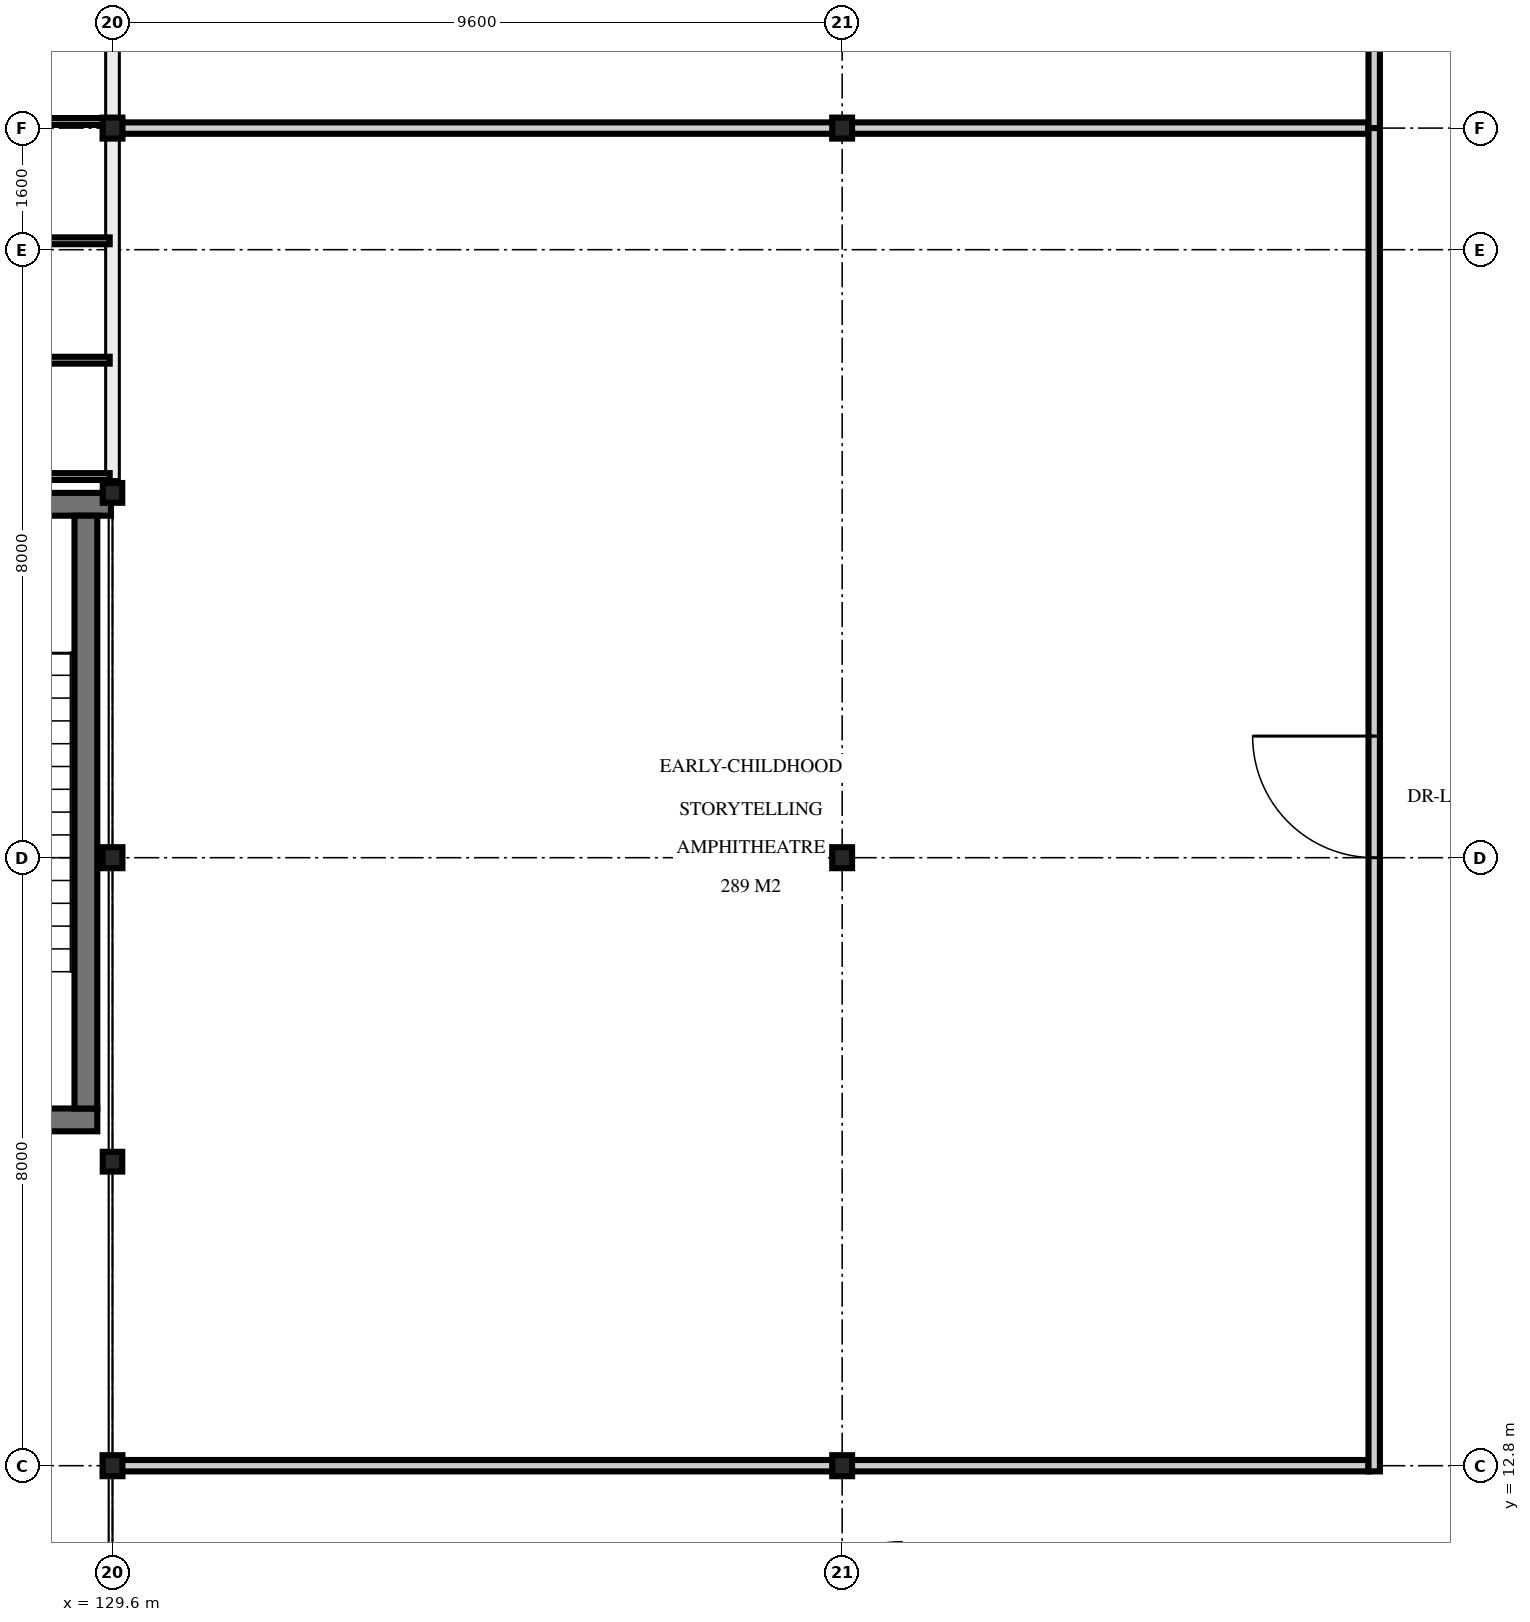
"""IFC4 building model, lengths in metres.
Left out: names, types, materials, properties, quantities, classifications, styles, units other than length and angle.
Written with IfcOpenShell. Run it as: python <this file> out.ifc"""

import sys

from ifc_helpers import new_model, si_unit, direction, frame, frame_2d, origin, origin_2d, place, context, subcontext, project, spatial, rectangle, i_section, extrude, element, fill, save


model = new_model("IFC4")
c1 = context("Model", 3, precision=1e-05, world=origin(), true_north=direction((0.0, 1.0)))
c2 = subcontext(c1, "Body", "Model", "MODEL_VIEW")
j1 = project(units=[si_unit("LENGTHUNIT", "METRE"), si_unit("PLANEANGLEUNIT", "RADIAN")], contexts=[c1])
p1 = place(None, origin())
s1 = spatial("IfcSite", under=j1, at=p1, CompositionType="ELEMENT")
p2 = place(p1, origin())
s2 = spatial("IfcBuilding", under=s1, at=p2, CompositionType="ELEMENT")
p3 = place(p2, origin())
s3 = spatial("IfcBuildingStorey", under=s2, at=p3, CompositionType="ELEMENT", Elevation=0.0)
for number, where, z_axis, x_axis in (
    (1, (129.6, 12.8, 0.0), (0.0, 0.0, 1.0), (1.0, 0.0, 0.0)),
    (2, (129.6, 20.8, 0.0), (0.0, 0.0, 1.0), (1.0, 0.0, 0.0)),
    (3, (129.6, 30.4, 0.0), (0.0, 0.0, 1.0), (1.0, 0.0, 0.0)),
    (4, (139.2, 12.8, 0.0), (0.0, 0.0, 1.0), (1.0, 0.0, 0.0)),
    (5, (139.2, 20.8, 0.0), (0.0, 0.0, 1.0), (1.0, 0.0, 0.0)),
    (6, (139.2, 30.4, 0.0), (0.0, 0.0, 1.0), (1.0, 0.0, 0.0)),
):
    element("IfcColumn", number, at=place(p3, frame(where, z_axis=z_axis, x_axis=x_axis)), inside=s3, PredefinedType="COLUMN", context=c2, shape_type="SweptSolid", body=[
        extrude(i_section(OverallWidth=0.261, OverallDepth=0.276, WebThickness=0.015, FlangeThickness=0.025, at=origin_2d()), origin(), (0.0, 0.0, 1.0), 5.1),
    ])
for number, where, z_axis, x_axis in (
    (7, (129.6, 16.8, 0.0), (0.0, 0.0, 1.0), (1.0, 0.0, 0.0)),
    (8, (129.6, 25.6, 0.0), (0.0, 0.0, 1.0), (1.0, 0.0, 0.0)),
):
    element("IfcColumn", number, at=place(p3, frame(where, z_axis=z_axis, x_axis=x_axis)), inside=s3, PredefinedType="COLUMN", context=c2, shape_type="SweptSolid", body=[
        extrude(i_section(OverallWidth=0.256, OverallDepth=0.26, WebThickness=0.01, FlangeThickness=0.017, at=origin_2d()), origin(), (0.0, 0.0, 1.0), 5.1),
    ])
p4 = place(p3, frame((129.4, 17.35, 0.0), z_axis=(0.0, 0.0, 1.0), x_axis=(-1.0, 0.0, 0.0)))
e9 = element("IfcWall", 9, at=p4, inside=s3, PredefinedType="SHEAR", context=c2, shape_type="SweptSolid", body=[
    extrude(rectangle(XDim=4.4, YDim=0.3, at=frame_2d((2.2, 0.0))), origin(), (0.0, 0.0, 1.0), 4.88),
])
p5 = place(p4, frame((1.65, 0.0, 0.0)))
e10 = element("IfcOpeningElement", 10, at=p5, cuts=e9, PredefinedType="OPENING", context=c2, shape_type="SweptSolid", body=[
    extrude(rectangle(XDim=1.1, YDim=2.2, at=frame_2d((0.55, 1.1))), frame((0.0, 0.16, 0.0), z_axis=(0.0, -1.0, 0.0), x_axis=(1.0, 0.0, 0.0)), (0.0, 0.0, 1.0), 0.32),
])
p6 = place(p3, frame((124.82, 25.45, 0.0), z_axis=(0.0, 0.0, 1.0), x_axis=(1.0, 0.0, 0.0)))
e11 = element("IfcWall", 11, at=p6, inside=s3, PredefinedType="SHEAR", context=c2, shape_type="SweptSolid", body=[
    extrude(rectangle(XDim=4.76, YDim=0.3, at=frame_2d((2.38, 0.0))), origin(), (0.0, 0.0, 1.0), 4.88),
])
p7 = place(p3, frame((129.25, 25.3, 0.0), z_axis=(0.0, 0.0, 1.0), x_axis=(0.0, -1.0, 0.0)))
e12 = element("IfcWall", 12, at=p7, inside=s3, PredefinedType="SHEAR", context=c2, shape_type="SweptSolid", body=[
    extrude(rectangle(XDim=7.8, YDim=0.3, at=frame_2d((3.9, 0.0))), origin(), (0.0, 0.0, 1.0), 4.88),
])
for number, where, z_axis, x_axis in (
    (13, (129.64, 12.8, 0.0), (0.0, 0.0, 1.0), (1.0, 0.0, 0.0)),
    (14, (129.64, 30.4, 0.0), (0.0, 0.0, 1.0), (1.0, 0.0, 0.0)),
):
    element("IfcWall", number, at=place(p3, frame(where, z_axis=z_axis, x_axis=x_axis)), inside=s3, PredefinedType="PARTITIONING", context=c2, shape_type="SweptSolid", body=[
        extrude(rectangle(XDim=16.485, YDim=0.15, at=frame_2d((8.243, 0.0))), origin(), (0.0, 0.0, 1.0), 4.442),
    ])
p8 = place(p3, frame((146.2, 12.725, 0.0), z_axis=(0.0, 0.0, 1.0), x_axis=(0.0, 1.0, 0.0)))
e15 = element("IfcWall", 15, at=p8, inside=s3, PredefinedType="PARTITIONING", context=c2, shape_type="SweptSolid", body=[
    extrude(rectangle(XDim=17.75, YDim=0.15, at=frame_2d((8.875, 0.0))), origin(), (0.0, 0.0, 1.0), 4.505),
])
p9 = place(p8, frame((8.075, 0.0, 0.0)))
e16 = element("IfcOpeningElement", 16, at=p9, cuts=e15, PredefinedType="OPENING", context=c2, shape_type="SweptSolid", body=[
    extrude(rectangle(XDim=1.6, YDim=2.25, at=frame_2d((0.8, 1.125))), frame((0.0, 0.085, 0.0), z_axis=(0.0, -1.0, 0.0), x_axis=(1.0, 0.0, 0.0)), (0.0, 0.0, 1.0), 0.17),
])
p10 = place(p3, frame((146.2, 30.4, 0.0), z_axis=(0.0, 0.0, 1.0), x_axis=(0.0, 1.0, 0.0)))
e17 = element("IfcWall", 17, at=p10, inside=s3, PredefinedType="PARTITIONING", context=c2, shape_type="SweptSolid", body=[
    extrude(rectangle(XDim=14.36, YDim=0.15, at=frame_2d((7.18, 0.0))), origin(), (0.0, 0.0, 1.0), 4.505),
])
p11 = place(p10, frame((6.705, 0.0, 0.0)))
e18 = element("IfcOpeningElement", 18, at=p11, cuts=e17, PredefinedType="OPENING", context=c2, shape_type="SweptSolid", body=[
    extrude(rectangle(XDim=0.95, YDim=2.15, at=frame_2d((0.475, 1.075))), frame((0.0, 0.085, 0.0), z_axis=(0.0, -1.0, 0.0), x_axis=(1.0, 0.0, 0.0)), (0.0, 0.0, 1.0), 0.17),
])
p12 = place(p9, origin())
e19 = element("IfcDoor", 19, at=p12, inside=s3, OperationType="DOUBLE_DOOR_SINGLE_SWING", PredefinedType="DOOR", context=c2, shape_type="SweptSolid", body=[
    extrude(rectangle(XDim=1.6, YDim=2.25, at=frame_2d((0.8, 1.125))), frame((0.0, 0.025, 0.0), z_axis=(0.0, -1.0, 0.0), x_axis=(1.0, 0.0, 0.0)), (0.0, 0.0, 1.0), 0.05),
])
fill(e16, e19)
save(model, sys.argv[1])
